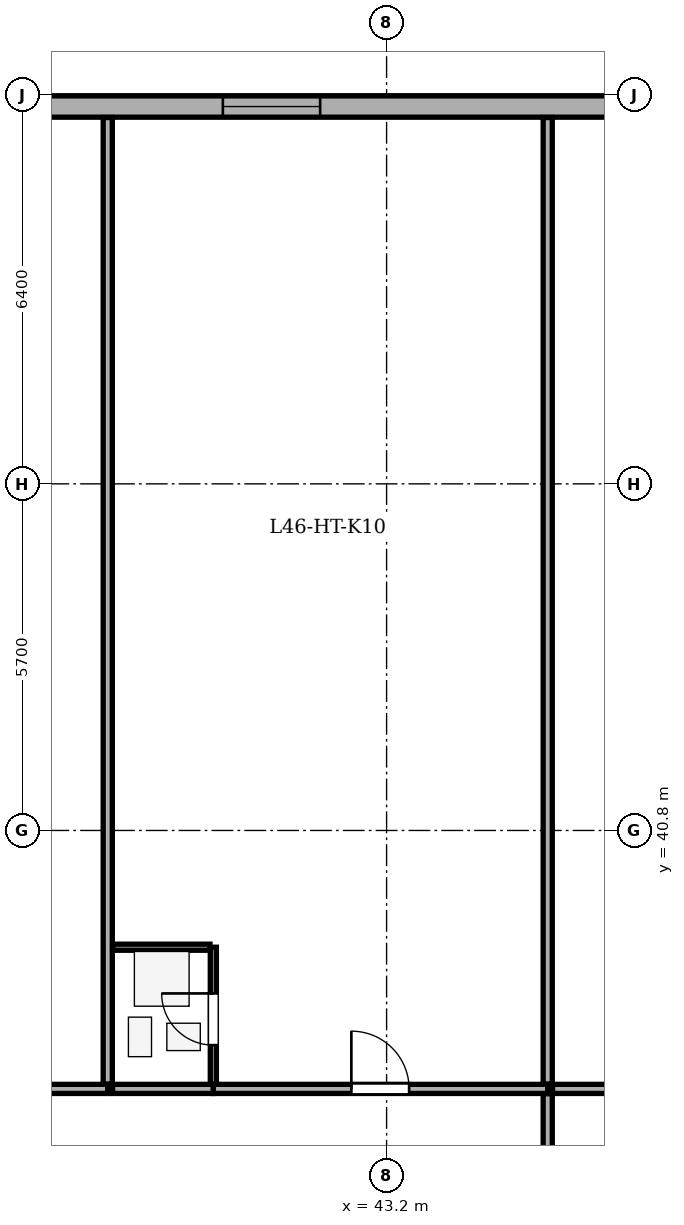
"""IFC4 building model, lengths in metres.
Left out: names, types, materials, properties, quantities, classifications, styles, units other than length and angle.
Written with IfcOpenShell. Run it as: python <this file> out.ifc"""

import sys

from ifc_helpers import new_model, si_unit, direction, frame, frame_2d, origin, place, context, subcontext, project, spatial, rectangle, extrude, element, fill, save


model = new_model("IFC4")
c1 = context("Model", 3, precision=1e-05, world=origin(), true_north=direction((0.0, 1.0)))
c2 = subcontext(c1, "Body", "Model", "MODEL_VIEW")
j1 = project(units=[si_unit("LENGTHUNIT", "METRE"), si_unit("PLANEANGLEUNIT", "RADIAN")], contexts=[c1])
p1 = place(None, origin())
s1 = spatial("IfcSite", under=j1, at=p1, CompositionType="ELEMENT")
p2 = place(p1, origin())
s2 = spatial("IfcBuilding", under=s1, at=p2, CompositionType="ELEMENT")
p3 = place(p2, frame((0.0, 0.0, 179.8)))
s3 = spatial("IfcBuildingStorey", under=s2, at=p3, CompositionType="ELEMENT", Elevation=179.8)
p4 = place(p3, frame((15.7, 52.705, 0.0), z_axis=(0.0, 0.0, 1.0), x_axis=(1.0, 0.0, 0.0)))
e1 = element("IfcWall", 1, at=p4, inside=s3, PredefinedType="STANDARD", context=c2, shape_type="SweptSolid", body=[
    extrude(rectangle(XDim=35.0, YDim=0.35, at=frame_2d((17.5, 0.0))), origin(), (0.0, 0.0, 1.0), 2.435),
])
p5 = place(p4, frame((8.0, 0.0, 0.0)))
e2 = element("IfcOpeningElement", 2, at=p5, cuts=e1, PredefinedType="OPENING", context=c2, shape_type="SweptSolid", body=[
    extrude(rectangle(XDim=1.0, YDim=2.02, at=frame_2d((0.5, 1.01))), frame((0.0, 0.185, 0.0), z_axis=(0.0, -1.0, 0.0), x_axis=(1.0, 0.0, 0.0)), (0.0, 0.0, 1.0), 0.37),
])
p6 = place(p4, frame((1.8, 0.0, 0.75)))
e3 = element("IfcOpeningElement", 3, at=p6, cuts=e1, PredefinedType="OPENING", context=c2, shape_type="SweptSolid", body=[
    extrude(rectangle(XDim=1.6, YDim=1.565, at=frame_2d((0.8, 0.782))), frame((0.0, 0.185, 0.0), z_axis=(0.0, -1.0, 0.0), x_axis=(1.0, 0.0, 0.0)), (0.0, 0.0, 1.0), 0.37),
])
p7 = place(p4, frame((16.4, 0.0, 0.75)))
e4 = element("IfcOpeningElement", 4, at=p7, cuts=e1, PredefinedType="OPENING", context=c2, shape_type="SweptSolid", body=[
    extrude(rectangle(XDim=1.6, YDim=1.565, at=frame_2d((0.8, 0.782))), frame((0.0, 0.185, 0.0), z_axis=(0.0, -1.0, 0.0), x_axis=(1.0, 0.0, 0.0)), (0.0, 0.0, 1.0), 0.37),
])
p8 = place(p4, frame((20.619, 0.0, 0.75)))
e5 = element("IfcOpeningElement", 5, at=p8, cuts=e1, PredefinedType="OPENING", context=c2, shape_type="SweptSolid", body=[
    extrude(rectangle(XDim=1.35, YDim=1.565, at=frame_2d((0.675, 0.782))), frame((0.0, 0.185, 0.0), z_axis=(0.0, -1.0, 0.0), x_axis=(1.0, 0.0, 0.0)), (0.0, 0.0, 1.0), 0.37),
])
p9 = place(p4, frame((24.807, 0.0, 0.75)))
e6 = element("IfcOpeningElement", 6, at=p9, cuts=e1, PredefinedType="OPENING", context=c2, shape_type="SweptSolid", body=[
    extrude(rectangle(XDim=1.6, YDim=1.565, at=frame_2d((0.8, 0.782))), frame((0.0, 0.185, 0.0), z_axis=(0.0, -1.0, 0.0), x_axis=(1.0, 0.0, 0.0)), (0.0, 0.0, 1.0), 0.37),
])
p10 = place(p4, frame((31.637, 0.0, 0.75)))
e7 = element("IfcOpeningElement", 7, at=p10, cuts=e1, PredefinedType="OPENING", context=c2, shape_type="SweptSolid", body=[
    extrude(rectangle(XDim=1.6, YDim=1.565, at=frame_2d((0.8, 0.782))), frame((0.0, 0.185, 0.0), z_axis=(0.0, -1.0, 0.0), x_axis=(1.0, 0.0, 0.0)), (0.0, 0.0, 1.0), 0.37),
])
p11 = place(p3, frame((32.656, 36.55, 0.0), z_axis=(0.0, 0.0, 1.0), x_axis=(1.0, 0.0, 0.0)))
e8 = element("IfcWall", 8, at=p11, inside=s3, PredefinedType="PARTITIONING", context=c2, shape_type="SweptSolid", body=[
    extrude(rectangle(XDim=5.958, YDim=0.15, at=frame_2d((2.979, 0.0))), origin(), (0.0, 0.0, 1.0), 3.05),
])
p12 = place(p11, frame((2.499, 0.0, 0.0)))
e9 = element("IfcOpeningElement", 9, at=p12, cuts=e8, PredefinedType="OPENING", context=c2, shape_type="SweptSolid", body=[
    extrude(rectangle(XDim=0.95, YDim=2.1, at=frame_2d((0.475, 1.05))), frame((0.0, 0.085, 0.0), z_axis=(0.0, -1.0, 0.0), x_axis=(1.0, 0.0, 0.0)), (0.0, 0.0, 1.0), 0.17),
])
p13 = place(p3, frame((38.614, 36.63, 0.0), z_axis=(0.0, 0.0, 1.0), x_axis=(0.0, 1.0, 0.0)))
e10 = element("IfcWall", 10, at=p13, inside=s3, PredefinedType="PARTITIONING", context=c2, shape_type="SweptSolid", body=[
    extrude(rectangle(XDim=15.895, YDim=0.15, at=frame_2d((7.948, 0.0))), origin(), (0.0, 0.0, 1.0), 2.485),
])
p14 = place(p3, frame((38.694, 36.55, 0.0), z_axis=(0.0, 0.0, 1.0), x_axis=(1.0, 0.0, 0.0)))
e11 = element("IfcWall", 11, at=p14, inside=s3, PredefinedType="PARTITIONING", context=c2, shape_type="SweptSolid", body=[
    extrude(rectangle(XDim=1.656, YDim=0.15, at=frame_2d((0.828, 0.0))), origin(), (0.0, 0.0, 1.0), 3.05),
])
p15 = place(p3, frame((40.351, 36.55, 0.0), z_axis=(0.0, 0.0, 1.0), x_axis=(1.0, 0.0, 0.0)))
e12 = element("IfcWall", 12, at=p15, inside=s3, PredefinedType="PARTITIONING", context=c2, shape_type="SweptSolid", body=[
    extrude(rectangle(XDim=5.5, YDim=0.15, at=frame_2d((2.75, 0.0))), origin(), (0.0, 0.0, 1.0), 3.05),
])
p16 = place(p15, frame((2.27, 0.0, 0.0)))
e13 = element("IfcOpeningElement", 13, at=p16, cuts=e12, PredefinedType="OPENING", context=c2, shape_type="SweptSolid", body=[
    extrude(rectangle(XDim=0.95, YDim=2.1, at=frame_2d((0.475, 1.05))), frame((0.0, 0.085, 0.0), z_axis=(0.0, -1.0, 0.0), x_axis=(1.0, 0.0, 0.0)), (0.0, 0.0, 1.0), 0.17),
])
p17 = place(p3, frame((40.351, 36.63, 0.0), z_axis=(0.0, 0.0, 1.0), x_axis=(0.0, 1.0, 0.0)))
e14 = element("IfcWall", 14, at=p17, inside=s3, PredefinedType="PARTITIONING", context=c2, shape_type="SweptSolid", body=[
    extrude(rectangle(XDim=2.25, YDim=0.1, at=frame_2d((1.125, 0.0))), origin(), (0.0, 0.0, 1.0), 2.485),
])
p18 = place(p17, frame((0.64, 0.0, 0.0)))
e15 = element("IfcOpeningElement", 15, at=p18, cuts=e14, PredefinedType="OPENING", context=c2, shape_type="SweptSolid", body=[
    extrude(rectangle(XDim=0.85, YDim=2.05, at=frame_2d((0.425, 1.025))), frame((0.0, 0.06, 0.0), z_axis=(0.0, -1.0, 0.0), x_axis=(1.0, 0.0, 0.0)), (0.0, 0.0, 1.0), 0.12),
])
p19 = place(p3, frame((38.694, 38.88, 0.0), z_axis=(0.0, 0.0, 1.0), x_axis=(1.0, 0.0, 0.0)))
e16 = element("IfcWall", 16, at=p19, inside=s3, PredefinedType="PARTITIONING", context=c2, shape_type="SweptSolid", body=[
    extrude(rectangle(XDim=1.602, YDim=0.1, at=frame_2d((0.801, 0.0))), origin(), (0.0, 0.0, 1.0), 3.05),
])
p20 = place(p3, frame((45.85, 36.63, 0.0), z_axis=(0.0, 0.0, 1.0), x_axis=(0.0, 1.0, 0.0)))
e17 = element("IfcWall", 17, at=p20, inside=s3, PredefinedType="PARTITIONING", context=c2, shape_type="SweptSolid", body=[
    extrude(rectangle(XDim=15.895, YDim=0.15, at=frame_2d((7.948, 0.0))), origin(), (0.0, 0.0, 1.0), 3.05),
])
p21 = place(p3, frame((45.93, 36.55, 0.0), z_axis=(0.0, 0.0, 1.0), x_axis=(1.0, 0.0, 0.0)))
e18 = element("IfcWall", 18, at=p21, inside=s3, PredefinedType="PARTITIONING", context=c2, shape_type="SweptSolid", body=[
    extrude(rectangle(XDim=9.395, YDim=0.15, at=frame_2d((4.698, 0.0))), origin(), (0.0, 0.0, 1.0), 3.05),
])
p22 = place(p3, frame((45.85, 30.08, 0.0), z_axis=(0.0, 0.0, 1.0), x_axis=(0.0, 1.0, 0.0)))
e19 = element("IfcWall", 19, at=p22, inside=s3, PredefinedType="PARTITIONING", context=c2, shape_type="SweptSolid", body=[
    extrude(rectangle(XDim=6.39, YDim=0.15, at=frame_2d((3.195, 0.0))), origin(), (0.0, 0.0, 1.0), 3.05),
])
p23 = place(p22, frame((2.715, 0.0, 0.0)))
e20 = element("IfcOpeningElement", 20, at=p23, cuts=e19, PredefinedType="OPENING", context=c2, shape_type="SweptSolid", body=[
    extrude(rectangle(XDim=0.95, YDim=2.1, at=frame_2d((0.475, 1.05))), frame((0.0, 0.085, 0.0), z_axis=(0.0, -1.0, 0.0), x_axis=(1.0, 0.0, 0.0)), (0.0, 0.0, 1.0), 0.17),
])
p24 = place(p9, origin())
e21 = element("IfcWindow", 21, at=p24, inside=s3, PartitioningType="SINGLE_PANEL", PredefinedType="WINDOW", context=c2, shape_type="SweptSolid", body=[
    extrude(rectangle(XDim=1.6, YDim=1.565, at=frame_2d((0.8, 0.782))), frame((0.0, -0.01, 0.0), z_axis=(0.0, -1.0, 0.0), x_axis=(1.0, 0.0, 0.0)), (0.0, 0.0, 1.0), 0.06),
])
fill(e6, e21)
p25 = place(p18, origin())
e22 = element("IfcDoor", 22, at=p25, inside=s3, OperationType="SINGLE_SWING_RIGHT", PredefinedType="DOOR", context=c2, shape_type="SweptSolid", body=[
    extrude(rectangle(XDim=0.85, YDim=2.05, at=frame_2d((0.425, 1.025))), frame((0.0, 0.025, 0.0), z_axis=(0.0, -1.0, 0.0), x_axis=(1.0, 0.0, 0.0)), (0.0, 0.0, 1.0), 0.05),
])
fill(e15, e22)
p26 = place(p16, origin())
e23 = element("IfcDoor", 23, at=p26, inside=s3, OperationType="SINGLE_SWING_LEFT", PredefinedType="DOOR", context=c2, shape_type="SweptSolid", body=[
    extrude(rectangle(XDim=0.95, YDim=2.1, at=frame_2d((0.475, 1.05))), frame((0.0, 0.025, 0.0), z_axis=(0.0, -1.0, 0.0), x_axis=(1.0, 0.0, 0.0)), (0.0, 0.0, 1.0), 0.05),
])
fill(e13, e23)
save(model, sys.argv[1])
